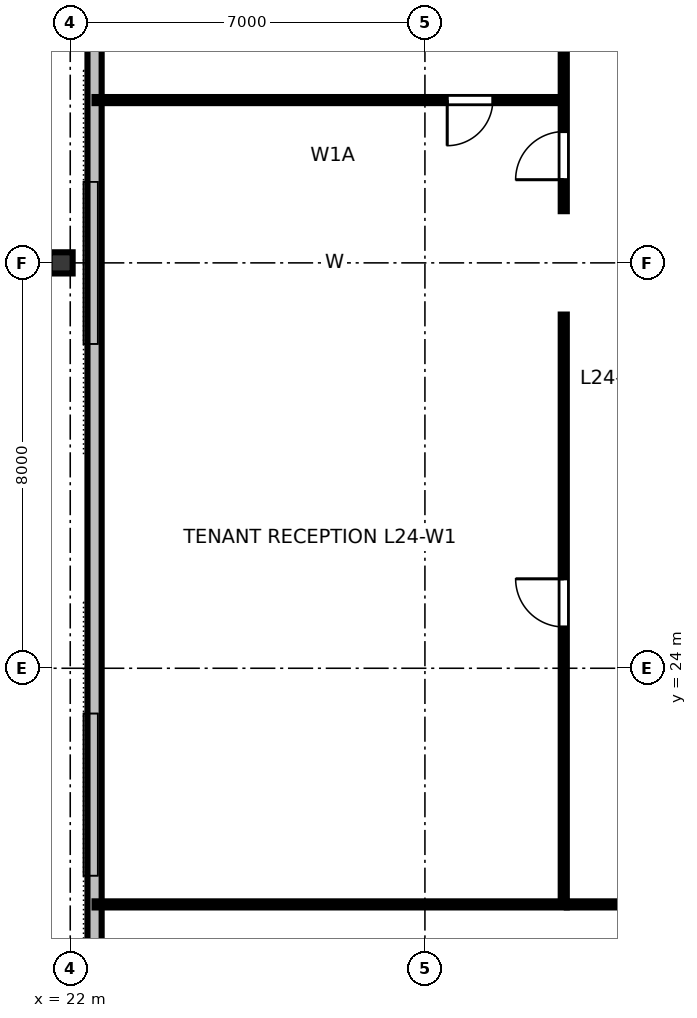
"""IFC4 building model, lengths in metres.
Left out: names, types, materials, properties, quantities, classifications, styles, units other than length and angle.
Written with IfcOpenShell. Run it as: python <this file> out.ifc"""

import sys

from ifc_helpers import new_model, si_unit, direction, frame, frame_2d, origin, origin_2d, place, context, subcontext, project, spatial, rectangle, i_section, extrude, element, fill, save


model = new_model("IFC4")
c1 = context("Model", 3, precision=1e-05, world=origin(), true_north=direction((0.0, 1.0)))
c2 = subcontext(c1, "Body", "Model", "MODEL_VIEW")
j1 = project(units=[si_unit("LENGTHUNIT", "METRE"), si_unit("PLANEANGLEUNIT", "RADIAN")], contexts=[c1])
p1 = place(None, origin())
s1 = spatial("IfcSite", under=j1, at=p1, CompositionType="ELEMENT")
p2 = place(p1, origin())
s2 = spatial("IfcBuilding", under=s1, at=p2, CompositionType="ELEMENT")
p3 = place(p2, frame((0.0, 0.0, 95.2)))
s3 = spatial("IfcBuildingStorey", under=s2, at=p3, CompositionType="ELEMENT", Elevation=95.2)
p4 = place(p3, frame((21.82, 32.0, 0.0), z_axis=(0.0, 0.0, 1.0), x_axis=(0.0, 1.0, 0.0)))
e1 = element("IfcColumn", 1, at=p4, inside=s3, PredefinedType="COLUMN", context=c2, shape_type="SweptSolid", body=[
    extrude(i_section(OverallWidth=0.418, OverallDepth=0.455, WebThickness=0.042, FlangeThickness=0.068, FilletRadius=0.025, at=origin_2d()), origin(), (0.0, 0.0, 1.0), 3.358),
])
p5 = place(p3, frame((22.48, 48.64, 0.0), z_axis=(0.0, 0.0, 1.0), x_axis=(0.0, -1.0, 0.0)))
e2 = element("IfcWall", 2, at=p5, inside=s3, PredefinedType="STANDARD", context=c2, shape_type="SweptSolid", body=[
    extrude(rectangle(XDim=33.28, YDim=0.28, at=frame_2d((16.64, 0.0))), origin(), (0.0, 0.0, 1.0), 3.36),
])
p6 = place(p3, frame((31.8, 19.34, 0.0), z_axis=(0.0, 0.0, 1.0), x_axis=(1.0, 0.0, 0.0)))
e3 = element("IfcWall", 3, at=p6, inside=s3, PredefinedType="PARTITIONING", context=c2, shape_type="SweptSolid", body=[
    extrude(rectangle(XDim=28.4, YDim=0.12, at=frame_2d((14.2, 0.0))), origin(), (0.0, 0.0, 1.0), 2.64),
])
p7 = place(p6, frame((4.201, 0.0, 0.0)))
e4 = element("IfcOpeningElement", 4, at=p7, cuts=e3, PredefinedType="OPENING", context=c2, shape_type="SweptSolid", body=[
    extrude(rectangle(XDim=0.95, YDim=2.15, at=frame_2d((0.475, 1.075))), frame((0.0, 0.07, 0.0), z_axis=(0.0, -1.0, 0.0), x_axis=(1.0, 0.0, 0.0)), (0.0, 0.0, 1.0), 0.14),
])
p8 = place(p6, frame((11.29, 0.0, 0.0)))
e5 = element("IfcOpeningElement", 5, at=p8, cuts=e3, PredefinedType="OPENING", context=c2, shape_type="SweptSolid", body=[
    extrude(rectangle(XDim=0.95, YDim=2.15, at=frame_2d((0.475, 1.075))), frame((0.0, 0.07, 0.0), z_axis=(0.0, -1.0, 0.0), x_axis=(1.0, 0.0, 0.0)), (0.0, 0.0, 1.0), 0.14),
])
p9 = place(p6, frame((17.423, 0.0, 0.0)))
e6 = element("IfcOpeningElement", 6, at=p9, cuts=e3, PredefinedType="OPENING", context=c2, shape_type="SweptSolid", body=[
    extrude(rectangle(XDim=0.95, YDim=2.15, at=frame_2d((0.475, 1.075))), frame((0.0, 0.07, 0.0), z_axis=(0.0, -1.0, 0.0), x_axis=(1.0, 0.0, 0.0)), (0.0, 0.0, 1.0), 0.14),
])
p10 = place(p6, frame((24.394, 0.0, 0.0)))
e7 = element("IfcOpeningElement", 7, at=p10, cuts=e3, PredefinedType="OPENING", context=c2, shape_type="SweptSolid", body=[
    extrude(rectangle(XDim=0.95, YDim=2.15, at=frame_2d((0.475, 1.075))), frame((0.0, 0.07, 0.0), z_axis=(0.0, -1.0, 0.0), x_axis=(1.0, 0.0, 0.0)), (0.0, 0.0, 1.0), 0.14),
])
p11 = place(p3, frame((31.74, 35.213, 0.0), z_axis=(0.0, 0.0, 1.0), x_axis=(-1.0, 0.0, 0.0)))
e8 = element("IfcWall", 8, at=p11, inside=s3, PredefinedType="PARTITIONING", context=c2, shape_type="SweptSolid", body=[
    extrude(rectangle(XDim=9.26, YDim=0.12, at=frame_2d((4.63, 0.0))), origin(), (0.0, 0.0, 1.0), 2.64),
])
p12 = place(p11, frame((1.4, 0.0, 0.0)))
e9 = element("IfcOpeningElement", 9, at=p12, cuts=e8, PredefinedType="OPENING", context=c2, shape_type="SweptSolid", body=[
    extrude(rectangle(XDim=0.9, YDim=2.15, at=frame_2d((0.45, 1.075))), frame((0.0, 0.07, 0.0), z_axis=(0.0, -1.0, 0.0), x_axis=(1.0, 0.0, 0.0)), (0.0, 0.0, 1.0), 0.14),
])
p13 = place(p3, frame((31.74, 19.4, 0.0), z_axis=(0.0, 0.0, 1.0), x_axis=(0.0, 1.0, 0.0)))
e10 = element("IfcWall", 10, at=p13, inside=s3, PredefinedType="PARTITIONING", context=c2, shape_type="SweptSolid", body=[
    extrude(rectangle(XDim=11.58, YDim=0.12, at=frame_2d((5.79, 0.0))), origin(), (0.0, 0.0, 1.0), 2.64),
])
p14 = place(p13, frame((5.415, 0.0, 0.0)))
e11 = element("IfcOpeningElement", 11, at=p14, cuts=e10, PredefinedType="OPENING", context=c2, shape_type="SweptSolid", body=[
    extrude(rectangle(XDim=0.95, YDim=2.15, at=frame_2d((0.475, 1.075))), frame((0.0, 0.07, 0.0), z_axis=(0.0, -1.0, 0.0), x_axis=(1.0, 0.0, 0.0)), (0.0, 0.0, 1.0), 0.14),
])
p15 = place(p3, frame((31.74, 33.02, 0.0), z_axis=(0.0, 0.0, 1.0), x_axis=(0.0, 1.0, 0.0)))
e12 = element("IfcWall", 12, at=p15, inside=s3, PredefinedType="PARTITIONING", context=c2, shape_type="SweptSolid", body=[
    extrude(rectangle(XDim=11.58, YDim=0.12, at=frame_2d((5.79, 0.0))), origin(), (0.0, 0.0, 1.0), 2.64),
])
p16 = place(p15, frame((0.621, 0.0, 0.0)))
e13 = element("IfcOpeningElement", 13, at=p16, cuts=e12, PredefinedType="OPENING", context=c2, shape_type="SweptSolid", body=[
    extrude(rectangle(XDim=0.95, YDim=2.15, at=frame_2d((0.475, 1.075))), frame((0.0, 0.07, 0.0), z_axis=(0.0, -1.0, 0.0), x_axis=(1.0, 0.0, 0.0)), (0.0, 0.0, 1.0), 0.14),
])
p17 = place(p15, frame((6.311, 0.0, 0.0)))
e14 = element("IfcOpeningElement", 14, at=p17, cuts=e12, PredefinedType="OPENING", context=c2, shape_type="SweptSolid", body=[
    extrude(rectangle(XDim=0.95, YDim=2.15, at=frame_2d((0.475, 1.075))), frame((0.0, 0.07, 0.0), z_axis=(0.0, -1.0, 0.0), x_axis=(1.0, 0.0, 0.0)), (0.0, 0.0, 1.0), 0.14),
])
p18 = place(p3, frame((31.8, 19.34, 0.0), z_axis=(0.0, 0.0, 1.0), x_axis=(-1.0, 0.0, 0.0)))
e15 = element("IfcWall", 15, at=p18, inside=s3, PredefinedType="PARTITIONING", context=c2, shape_type="SweptSolid", body=[
    extrude(rectangle(XDim=9.32, YDim=0.12, at=frame_2d((4.66, 0.0))), origin(), (0.0, 0.0, 1.0), 2.64),
])
p19 = place(p12, origin())
e16 = element("IfcDoor", 16, at=p19, inside=s3, OperationType="SINGLE_SWING_RIGHT", PredefinedType="DOOR", context=c2, shape_type="SweptSolid", body=[
    extrude(rectangle(XDim=0.9, YDim=2.15, at=frame_2d((0.45, 1.075))), frame((0.0, 0.025, 0.0), z_axis=(0.0, -1.0, 0.0), x_axis=(1.0, 0.0, 0.0)), (0.0, 0.0, 1.0), 0.05),
])
fill(e9, e16)
p20 = place(p14, origin())
e17 = element("IfcDoor", 17, at=p20, inside=s3, OperationType="SINGLE_SWING_RIGHT", PredefinedType="DOOR", context=c2, shape_type="SweptSolid", body=[
    extrude(rectangle(XDim=0.95, YDim=2.15, at=frame_2d((0.475, 1.075))), frame((0.0, 0.025, 0.0), z_axis=(0.0, -1.0, 0.0), x_axis=(1.0, 0.0, 0.0)), (0.0, 0.0, 1.0), 0.05),
])
fill(e11, e17)
p21 = place(p16, origin())
e18 = element("IfcDoor", 18, at=p21, inside=s3, OperationType="SINGLE_SWING_LEFT", PredefinedType="DOOR", context=c2, shape_type="SweptSolid", body=[
    extrude(rectangle(XDim=0.95, YDim=2.15, at=frame_2d((0.475, 1.075))), frame((0.0, 0.025, 0.0), z_axis=(0.0, -1.0, 0.0), x_axis=(1.0, 0.0, 0.0)), (0.0, 0.0, 1.0), 0.05),
])
fill(e13, e18)
save(model, sys.argv[1])
